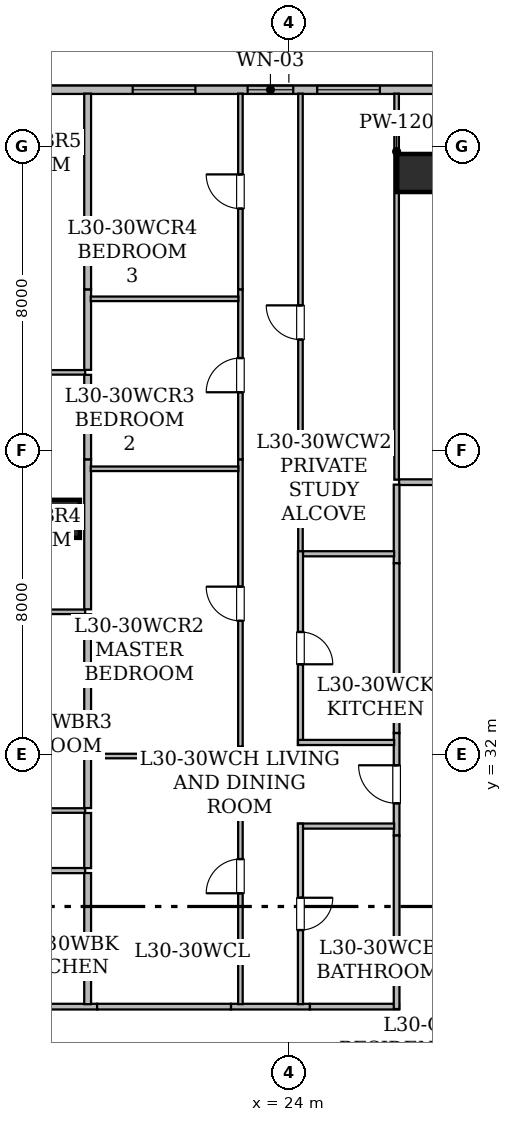
"""IFC4 building model, lengths in metres.
Left out: names, types, materials, properties, quantities, classifications, styles, units other than length and angle.
Written with IfcOpenShell. Run it as: python <this file> out.ifc"""

import sys

from ifc_helpers import new_model, si_unit, direction, frame, frame_2d, origin, origin_2d, place, context, subcontext, project, spatial, rectangle, hollow_rectangle, extrude, element, fill, save


model = new_model("IFC4")
c1 = context("Model", 3, precision=1e-05, world=origin(), true_north=direction((0.0, 1.0)))
c2 = subcontext(c1, "Body", "Model", "MODEL_VIEW")
j1 = project(units=[si_unit("LENGTHUNIT", "METRE"), si_unit("PLANEANGLEUNIT", "RADIAN")], contexts=[c1])
p1 = place(None, origin())
s1 = spatial("IfcSite", under=j1, at=p1, CompositionType="ELEMENT")
p2 = place(p1, origin())
s2 = spatial("IfcBuilding", under=s1, at=p2, CompositionType="ELEMENT")
p3 = place(p2, frame((0.0, 0.0, 120.15)))
s3 = spatial("IfcBuildingStorey", under=s2, at=p3, CompositionType="ELEMENT", Elevation=120.15)
for number, where, z_axis, x_axis in (
    (1, (27.35, 47.3, 0.0), (0.0, 0.0, 1.0), (1.0, 0.0, 0.0)),
    (2, (18.0, 38.2, 0.0), (0.0, 0.0, 1.0), (1.0, 0.0, 0.0)),
):
    element("IfcColumn", number, at=place(p3, frame(where, z_axis=z_axis, x_axis=x_axis)), inside=s3, PredefinedType="COLUMN", context=c2, shape_type="SweptSolid", body=[
        extrude(hollow_rectangle(XDim=1.0, YDim=1.0, WallThickness=0.05, at=origin_2d()), origin(), (0.0, 0.0, 1.0), 3.65),
    ])
p4 = place(p3, frame((13.715, 49.49, 0.0), z_axis=(0.0, 0.0, 1.0), x_axis=(1.0, 0.0, 0.0)))
e3 = element("IfcWall", 3, at=p4, inside=s3, PredefinedType="STANDARD", context=c2, shape_type="SweptSolid", body=[
    extrude(rectangle(XDim=38.639, YDim=0.22, at=frame_2d((19.319, 0.0))), origin(), (0.0, 0.0, 1.0), 3.43),
])
p5 = place(p4, frame((16.16, 0.0, 0.85)))
e4 = element("IfcOpeningElement", 4, at=p5, cuts=e3, PredefinedType="OPENING", context=c2, shape_type="SweptSolid", body=[
    extrude(rectangle(XDim=1.65, YDim=1.55, at=frame_2d((0.825, 0.775))), frame((0.0, 0.12, 0.0), z_axis=(0.0, -1.0, 0.0), x_axis=(1.0, 0.0, 0.0)), (0.0, 0.0, 1.0), 0.24),
])
p6 = place(p4, frame((2.243, 0.0, 0.85)))
e5 = element("IfcOpeningElement", 5, at=p6, cuts=e3, PredefinedType="OPENING", context=c2, shape_type="SweptSolid", body=[
    extrude(rectangle(XDim=1.65, YDim=1.55, at=frame_2d((0.825, 0.775))), frame((0.0, 0.12, 0.0), z_axis=(0.0, -1.0, 0.0), x_axis=(1.0, 0.0, 0.0)), (0.0, 0.0, 1.0), 0.24),
])
p7 = place(p4, frame((11.03, 0.0, 0.85)))
e6 = element("IfcOpeningElement", 6, at=p7, cuts=e3, PredefinedType="OPENING", context=c2, shape_type="SweptSolid", body=[
    extrude(rectangle(XDim=1.65, YDim=1.55, at=frame_2d((0.825, 0.775))), frame((0.0, 0.12, 0.0), z_axis=(0.0, -1.0, 0.0), x_axis=(1.0, 0.0, 0.0)), (0.0, 0.0, 1.0), 0.24),
])
p8 = place(p4, frame((9.2, 0.0, 0.8)))
e7 = element("IfcOpeningElement", 7, at=p8, cuts=e3, PredefinedType="OPENING", context=c2, shape_type="SweptSolid", body=[
    extrude(rectangle(XDim=1.2, YDim=1.5, at=frame_2d((0.6, 0.75))), frame((0.0, 0.12, 0.0), z_axis=(0.0, -1.0, 0.0), x_axis=(1.0, 0.0, 0.0)), (0.0, 0.0, 1.0), 0.24),
])
p9 = place(p4, frame((6.175, 0.0, 0.85)))
e8 = element("IfcOpeningElement", 8, at=p9, cuts=e3, PredefinedType="OPENING", context=c2, shape_type="SweptSolid", body=[
    extrude(rectangle(XDim=1.65, YDim=1.55, at=frame_2d((0.825, 0.775))), frame((0.0, 0.12, 0.0), z_axis=(0.0, -1.0, 0.0), x_axis=(1.0, 0.0, 0.0)), (0.0, 0.0, 1.0), 0.24),
])
p10 = place(p4, frame((23.425, 0.0, 0.85)))
e9 = element("IfcOpeningElement", 9, at=p10, cuts=e3, PredefinedType="OPENING", context=c2, shape_type="SweptSolid", body=[
    extrude(rectangle(XDim=1.65, YDim=1.55, at=frame_2d((0.825, 0.775))), frame((0.0, 0.12, 0.0), z_axis=(0.0, -1.0, 0.0), x_axis=(1.0, 0.0, 0.0)), (0.0, 0.0, 1.0), 0.24),
])
p11 = place(p4, frame((30.23, 0.0, 0.85)))
e10 = element("IfcOpeningElement", 10, at=p11, cuts=e3, PredefinedType="OPENING", context=c2, shape_type="SweptSolid", body=[
    extrude(rectangle(XDim=1.65, YDim=1.55, at=frame_2d((0.825, 0.775))), frame((0.0, 0.12, 0.0), z_axis=(0.0, -1.0, 0.0), x_axis=(1.0, 0.0, 0.0)), (0.0, 0.0, 1.0), 0.24),
])
p12 = place(p4, frame((36.367, 0.0, 0.85)))
e11 = element("IfcOpeningElement", 11, at=p12, cuts=e3, PredefinedType="OPENING", context=c2, shape_type="SweptSolid", body=[
    extrude(rectangle(XDim=1.65, YDim=1.55, at=frame_2d((0.825, 0.775))), frame((0.0, 0.12, 0.0), z_axis=(0.0, -1.0, 0.0), x_axis=(1.0, 0.0, 0.0)), (0.0, 0.0, 1.0), 0.24),
])
p13 = place(p3, frame((26.9, 39.165, 0.0), z_axis=(0.0, 0.0, 1.0), x_axis=(1.0, 0.0, 0.0)))
e12 = element("IfcWall", 12, at=p13, inside=s3, PredefinedType="STANDARD", context=c2, shape_type="SweptSolid", body=[
    extrude(rectangle(XDim=7.914, YDim=0.15, at=frame_2d((3.957, 0.0))), origin(), (0.0, 0.0, 1.0), 2.647),
])
p14 = place(p13, frame((3.486, 0.0, 0.0)))
e13 = element("IfcOpeningElement", 13, at=p14, cuts=e12, PredefinedType="OPENING", context=c2, shape_type="SweptSolid", body=[
    extrude(rectangle(XDim=0.9, YDim=2.1, at=frame_2d((0.45, 1.05))), frame((0.0, 0.085, 0.0), z_axis=(0.0, -1.0, 0.0), x_axis=(1.0, 0.0, 0.0)), (0.0, 0.0, 1.0), 0.17),
])
p15 = place(p3, frame((15.674, 25.365, 0.0), z_axis=(0.0, 0.0, 1.0), x_axis=(1.0, 0.0, 0.0)))
e14 = element("IfcWall", 14, at=p15, inside=s3, PredefinedType="STANDARD", context=c2, shape_type="SweptSolid", body=[
    extrude(rectangle(XDim=3.28, YDim=0.15, at=frame_2d((1.64, 0.0))), origin(), (0.0, 0.0, 1.0), 2.647),
])
p16 = place(p3, frame((26.835, 37.032, 0.0), z_axis=(0.0, 0.0, 1.0), x_axis=(0.0, 1.0, 0.0)))
e15 = element("IfcWall", 15, at=p16, inside=s3, PredefinedType="STANDARD", context=c2, shape_type="SweptSolid", body=[
    extrude(rectangle(XDim=2.068, YDim=0.15, at=frame_2d((1.034, 0.0))), origin(), (0.0, 0.0, 1.0), 2.647),
])
p17 = place(p3, frame((22.476, 25.365, 0.0), z_axis=(0.0, 0.0, 1.0), x_axis=(1.0, 0.0, 0.0)))
e16 = element("IfcWall", 16, at=p17, inside=s3, PredefinedType="STANDARD", context=c2, shape_type="SweptSolid", body=[
    extrude(rectangle(XDim=2.078, YDim=0.15, at=frame_2d((1.039, 0.0))), origin(), (0.0, 0.0, 1.0), 3.43),
])
p18 = place(p3, frame((26.835, 29.867, 0.0), z_axis=(0.0, 0.0, 1.0), x_axis=(0.0, 1.0, 0.0)))
e17 = element("IfcWall", 17, at=p18, inside=s3, PredefinedType="STANDARD", context=c2, shape_type="SweptSolid", body=[
    extrude(rectangle(XDim=2.698, YDim=0.15, at=frame_2d((1.349, 0.0))), origin(), (0.0, 0.0, 1.0), 3.43),
])
p19 = place(p18, frame((0.849, 0.0, 0.0)))
e18 = element("IfcOpeningElement", 18, at=p19, cuts=e17, PredefinedType="OPENING", context=c2, shape_type="SweptSolid", body=[
    extrude(rectangle(XDim=1.0, YDim=2.15, at=frame_2d((0.5, 1.075))), frame((0.0, 0.085, 0.0), z_axis=(0.0, -1.0, 0.0), x_axis=(1.0, 0.0, 0.0)), (0.0, 0.0, 1.0), 0.17),
])
p20 = place(p3, frame((24.554, 25.365, 0.0), z_axis=(0.0, 0.0, 1.0), x_axis=(1.0, 0.0, 0.0)))
e19 = element("IfcWall", 19, at=p20, inside=s3, PredefinedType="STANDARD", context=c2, shape_type="SweptSolid", body=[
    extrude(rectangle(XDim=2.346, YDim=0.15, at=frame_2d((1.173, 0.0))), origin(), (0.0, 0.0, 1.0), 3.43),
])
p21 = place(p3, frame((26.835, 25.302, 0.0), z_axis=(0.0, 0.0, 1.0), x_axis=(0.0, 1.0, 0.0)))
e20 = element("IfcWall", 20, at=p21, inside=s3, PredefinedType="STANDARD", context=c2, shape_type="SweptSolid", body=[
    extrude(rectangle(XDim=4.565, YDim=0.15, at=frame_2d((2.282, 0.0))), origin(), (0.0, 0.0, 1.0), 3.013),
])
p22 = place(p3, frame((26.835, 32.565, 0.0), z_axis=(0.0, 0.0, 1.0), x_axis=(0.0, 1.0, 0.0)))
e21 = element("IfcWall", 21, at=p22, inside=s3, PredefinedType="STANDARD", context=c2, shape_type="SweptSolid", body=[
    extrude(rectangle(XDim=4.467, YDim=0.15, at=frame_2d((2.233, 0.0))), origin(), (0.0, 0.0, 1.0), 2.647),
])
p23 = place(p3, frame((18.954, 25.365, 0.0), z_axis=(0.0, 0.0, 1.0), x_axis=(1.0, 0.0, 0.0)))
e22 = element("IfcWall", 22, at=p23, inside=s3, PredefinedType="STANDARD", context=c2, shape_type="SweptSolid", body=[
    extrude(rectangle(XDim=3.522, YDim=0.15, at=frame_2d((1.761, 0.0))), origin(), (0.0, 0.0, 1.0), 3.43),
])
p24 = place(p3, frame((26.835, 39.23, 0.0), z_axis=(0.0, 0.0, 1.0), x_axis=(0.0, 1.0, 0.0)))
e23 = element("IfcWall", 23, at=p24, inside=s3, PredefinedType="PARTITIONING", context=c2, shape_type="SweptSolid", body=[
    extrude(rectangle(XDim=10.158, YDim=0.12, at=frame_2d((5.079, 0.0))), origin(), (0.0, 0.0, 1.0), 2.876),
])
p25 = place(p3, frame((18.64, 28.945, 0.0), z_axis=(0.0, 0.0, 1.0), x_axis=(-1.0, 0.0, 0.0)))
e24 = element("IfcWall", 24, at=p25, inside=s3, PredefinedType="PARTITIONING", context=c2, shape_type="SweptSolid", body=[
    extrude(rectangle(XDim=2.75, YDim=0.135, at=frame_2d((1.375, 0.0))), origin(), (0.0, 0.0, 1.0), 2.647),
])
p26 = place(p3, frame((14.795, 30.525, 0.0), z_axis=(0.0, 0.0, 1.0), x_axis=(1.0, 0.0, 0.0)))
e25 = element("IfcWall", 25, at=p26, inside=s3, PredefinedType="PARTITIONING", context=c2, shape_type="SweptSolid", body=[
    extrude(rectangle(XDim=3.845, YDim=0.12, at=frame_2d((1.922, 0.0))), origin(), (0.0, 0.0, 1.0), 2.647),
])
p27 = place(p3, frame((18.705, 30.46, 0.0), z_axis=(0.0, 0.0, 1.0), x_axis=(0.0, -1.0, 0.0)))
e26 = element("IfcWall", 26, at=p27, inside=s3, PredefinedType="STANDARD", context=c2, shape_type="SweptSolid", body=[
    extrude(rectangle(XDim=1.45, YDim=0.18, at=frame_2d((0.725, 0.0))), origin(), (0.0, 0.0, 1.0), 3.43),
])
p28 = place(p3, frame((18.705, 28.88, 0.0), z_axis=(0.0, 0.0, 1.0), x_axis=(0.0, -1.0, 0.0)))
e27 = element("IfcWall", 27, at=p28, inside=s3, PredefinedType="STANDARD", context=c2, shape_type="SweptSolid", body=[
    extrude(rectangle(XDim=3.45, YDim=0.18, at=frame_2d((1.725, 0.0))), origin(), (0.0, 0.0, 1.0), 3.013),
])
p29 = place(p3, frame((14.914, 35.754, 0.0), z_axis=(0.0, 0.0, 1.0), x_axis=(1.0, 0.0, 0.0)))
e28 = element("IfcWall", 28, at=p29, inside=s3, PredefinedType="PARTITIONING", context=c2, shape_type="SweptSolid", body=[
    extrude(rectangle(XDim=3.726, YDim=0.12, at=frame_2d((1.863, 0.0))), origin(), (0.0, 0.0, 1.0), 2.647),
])
p30 = place(p3, frame((18.705, 32.208, 0.0), z_axis=(0.0, 0.0, 1.0), x_axis=(0.0, -1.0, 0.0)))
e29 = element("IfcWall", 29, at=p30, inside=s3, PredefinedType="STANDARD", context=c2, shape_type="SweptSolid", body=[
    extrude(rectangle(XDim=1.618, YDim=0.18, at=frame_2d((0.809, 0.0))), origin(), (0.0, 0.0, 1.0), 3.43),
])
p31 = place(p3, frame((18.705, 35.689, 0.0), z_axis=(0.0, 0.0, 1.0), x_axis=(0.0, -1.0, 0.0)))
e30 = element("IfcWall", 30, at=p31, inside=s3, PredefinedType="STANDARD", context=c2, shape_type="SweptSolid", body=[
    extrude(rectangle(XDim=3.481, YDim=0.18, at=frame_2d((1.74, 0.0))), origin(), (0.0, 0.0, 1.0), 3.43),
])
p32 = place(p3, frame((14.914, 42.054, 0.0), z_axis=(0.0, 0.0, 1.0), x_axis=(1.0, 0.0, 0.0)))
e31 = element("IfcWall", 31, at=p32, inside=s3, PredefinedType="PARTITIONING", context=c2, shape_type="SweptSolid", body=[
    extrude(rectangle(XDim=3.726, YDim=0.12, at=frame_2d((1.863, 0.0))), origin(), (0.0, 0.0, 1.0), 2.647),
])
p33 = place(p3, frame((18.705, 39.766, 0.0), z_axis=(0.0, 0.0, 1.0), x_axis=(0.0, -1.0, 0.0)))
e32 = element("IfcWall", 32, at=p33, inside=s3, PredefinedType="STANDARD", context=c2, shape_type="SweptSolid", body=[
    extrude(rectangle(XDim=3.947, YDim=0.18, at=frame_2d((1.974, 0.0))), origin(), (0.0, 0.0, 1.0), 2.647),
])
p34 = place(p3, frame((18.705, 41.989, 0.0), z_axis=(0.0, 0.0, 1.0), x_axis=(0.0, -1.0, 0.0)))
e33 = element("IfcWall", 33, at=p34, inside=s3, PredefinedType="STANDARD", context=c2, shape_type="SweptSolid", body=[
    extrude(rectangle(XDim=2.223, YDim=0.18, at=frame_2d((1.111, 0.0))), origin(), (0.0, 0.0, 1.0), 3.43),
])
p35 = place(p3, frame((18.705, 44.238, 0.0), z_axis=(0.0, 0.0, 1.0), x_axis=(0.0, -1.0, 0.0)))
e34 = element("IfcWall", 34, at=p35, inside=s3, PredefinedType="STANDARD", context=c2, shape_type="SweptSolid", body=[
    extrude(rectangle(XDim=2.119, YDim=0.18, at=frame_2d((1.06, 0.0))), origin(), (0.0, 0.0, 1.0), 3.43),
])
p36 = place(p3, frame((18.705, 49.388, 0.0), z_axis=(0.0, 0.0, 1.0), x_axis=(0.0, -1.0, 0.0)))
e35 = element("IfcWall", 35, at=p36, inside=s3, PredefinedType="STANDARD", context=c2, shape_type="SweptSolid", body=[
    extrude(rectangle(XDim=5.15, YDim=0.18, at=frame_2d((2.575, 0.0))), origin(), (0.0, 0.0, 1.0), 2.876),
])
p37 = place(p3, frame((24.305, 37.346, 0.0), z_axis=(0.0, 0.0, 1.0), x_axis=(0.0, 1.0, 0.0)))
e36 = element("IfcWall", 36, at=p37, inside=s3, PredefinedType="PARTITIONING", context=c2, shape_type="SweptSolid", body=[
    extrude(rectangle(XDim=12.042, YDim=0.12, at=frame_2d((6.021, 0.0))), origin(), (0.0, 0.0, 1.0), 2.647),
])
p38 = place(p37, frame((5.571, 0.0, 0.0)))
e37 = element("IfcOpeningElement", 37, at=p38, cuts=e36, PredefinedType="OPENING", context=c2, shape_type="SweptSolid", body=[
    extrude(rectangle(XDim=0.9, YDim=2.1, at=frame_2d((0.45, 1.05))), frame((0.0, 0.07, 0.0), z_axis=(0.0, -1.0, 0.0), x_axis=(1.0, 0.0, 0.0)), (0.0, 0.0, 1.0), 0.14),
])
p39 = place(p3, frame((26.77, 37.281, 0.0), z_axis=(0.0, 0.0, 1.0), x_axis=(-1.0, 0.0, 0.0)))
e38 = element("IfcWall", 38, at=p39, inside=s3, PredefinedType="PARTITIONING", context=c2, shape_type="SweptSolid", body=[
    extrude(rectangle(XDim=2.4, YDim=0.135, at=frame_2d((1.2, 0.0))), origin(), (0.0, 0.0, 1.0), 2.647),
])
p40 = place(p3, frame((26.77, 30.116, 0.0), z_axis=(0.0, 0.0, 1.0), x_axis=(-1.0, 0.0, 0.0)))
e39 = element("IfcWall", 39, at=p40, inside=s3, PredefinedType="PARTITIONING", context=c2, shape_type="SweptSolid", body=[
    extrude(rectangle(XDim=2.53, YDim=0.135, at=frame_2d((1.265, 0.0))), origin(), (0.0, 0.0, 1.0), 3.43),
])
p41 = place(p3, frame((24.305, 30.181, 0.0), z_axis=(0.0, 0.0, 1.0), x_axis=(0.0, -1.0, 0.0)))
e40 = element("IfcWall", 40, at=p41, inside=s3, PredefinedType="PARTITIONING", context=c2, shape_type="SweptSolid", body=[
    extrude(rectangle(XDim=4.751, YDim=0.135, at=frame_2d((2.375, 0.0))), origin(), (0.0, 0.0, 1.0), 3.013),
])
p42 = place(p41, frame((1.951, 0.0, 0.0)))
e41 = element("IfcOpeningElement", 41, at=p42, cuts=e40, PredefinedType="OPENING", context=c2, shape_type="SweptSolid", body=[
    extrude(rectangle(XDim=0.85, YDim=2.1, at=frame_2d((0.425, 1.05))), frame((0.0, 0.077, 0.0), z_axis=(0.0, -1.0, 0.0), x_axis=(1.0, 0.0, 0.0)), (0.0, 0.0, 1.0), 0.155),
])
p43 = place(p3, frame((24.305, 37.346, 0.0), z_axis=(0.0, 0.0, 1.0), x_axis=(0.0, -1.0, 0.0)))
e42 = element("IfcWall", 42, at=p43, inside=s3, PredefinedType="PARTITIONING", context=c2, shape_type="SweptSolid", body=[
    extrude(rectangle(XDim=5.095, YDim=0.135, at=frame_2d((2.547, 0.0))), origin(), (0.0, 0.0, 1.0), 2.647),
])
p44 = place(p43, frame((2.123, 0.0, 0.0)))
e43 = element("IfcOpeningElement", 43, at=p44, cuts=e42, PredefinedType="OPENING", context=c2, shape_type="SweptSolid", body=[
    extrude(rectangle(XDim=0.85, YDim=2.1, at=frame_2d((0.425, 1.05))), frame((0.0, 0.077, 0.0), z_axis=(0.0, -1.0, 0.0), x_axis=(1.0, 0.0, 0.0)), (0.0, 0.0, 1.0), 0.155),
])
p45 = place(p3, frame((24.24, 32.316, 0.0), z_axis=(0.0, 0.0, 1.0), x_axis=(1.0, 0.0, 0.0)))
e44 = element("IfcWall", 44, at=p45, inside=s3, PredefinedType="PARTITIONING", context=c2, shape_type="SweptSolid", body=[
    extrude(rectangle(XDim=2.53, YDim=0.135, at=frame_2d((1.265, 0.0))), origin(), (0.0, 0.0, 1.0), 3.43),
])
p46 = place(p3, frame((22.725, 25.43, 0.0), z_axis=(0.0, 0.0, 1.0), x_axis=(0.0, 1.0, 0.0)))
e45 = element("IfcWall", 45, at=p46, inside=s3, PredefinedType="PARTITIONING", context=c2, shape_type="SweptSolid", body=[
    extrude(rectangle(XDim=6.778, YDim=0.12, at=frame_2d((3.389, 0.0))), origin(), (0.0, 0.0, 1.0), 3.013),
])
p47 = place(p46, frame((2.918, 0.0, 0.0)))
e46 = element("IfcOpeningElement", 46, at=p47, cuts=e45, PredefinedType="OPENING", context=c2, shape_type="SweptSolid", body=[
    extrude(rectangle(XDim=0.9, YDim=2.1, at=frame_2d((0.45, 1.05))), frame((0.0, 0.07, 0.0), z_axis=(0.0, -1.0, 0.0), x_axis=(1.0, 0.0, 0.0)), (0.0, 0.0, 1.0), 0.14),
])
p48 = place(p3, frame((22.725, 32.208, 0.0), z_axis=(0.0, 0.0, 1.0), x_axis=(0.0, 1.0, 0.0)))
e47 = element("IfcWall", 47, at=p48, inside=s3, PredefinedType="PARTITIONING", context=c2, shape_type="SweptSolid", body=[
    extrude(rectangle(XDim=7.558, YDim=0.12, at=frame_2d((3.779, 0.0))), origin(), (0.0, 0.0, 1.0), 2.647),
])
p49 = place(p48, frame((3.308, 0.0, 0.0)))
e48 = element("IfcOpeningElement", 48, at=p49, cuts=e47, PredefinedType="OPENING", context=c2, shape_type="SweptSolid", body=[
    extrude(rectangle(XDim=0.9, YDim=2.1, at=frame_2d((0.45, 1.05))), frame((0.0, 0.07, 0.0), z_axis=(0.0, -1.0, 0.0), x_axis=(1.0, 0.0, 0.0)), (0.0, 0.0, 1.0), 0.14),
])
p50 = place(p3, frame((22.725, 39.766, 0.0), z_axis=(0.0, 0.0, 1.0), x_axis=(0.0, 1.0, 0.0)))
e49 = element("IfcWall", 49, at=p50, inside=s3, PredefinedType="PARTITIONING", context=c2, shape_type="SweptSolid", body=[
    extrude(rectangle(XDim=4.472, YDim=0.12, at=frame_2d((2.236, 0.0))), origin(), (0.0, 0.0, 1.0), 3.43),
])
p51 = place(p50, frame((1.765, 0.0, 0.0)))
e50 = element("IfcOpeningElement", 50, at=p51, cuts=e49, PredefinedType="OPENING", context=c2, shape_type="SweptSolid", body=[
    extrude(rectangle(XDim=0.9, YDim=2.1, at=frame_2d((0.45, 1.05))), frame((0.0, 0.07, 0.0), z_axis=(0.0, -1.0, 0.0), x_axis=(1.0, 0.0, 0.0)), (0.0, 0.0, 1.0), 0.14),
])
p52 = place(p3, frame((22.725, 44.238, 0.0), z_axis=(0.0, 0.0, 1.0), x_axis=(0.0, 1.0, 0.0)))
e51 = element("IfcWall", 51, at=p52, inside=s3, PredefinedType="PARTITIONING", context=c2, shape_type="SweptSolid", body=[
    extrude(rectangle(XDim=5.15, YDim=0.12, at=frame_2d((2.575, 0.0))), origin(), (0.0, 0.0, 1.0), 2.876),
])
p53 = place(p52, frame((2.125, 0.0, 0.0)))
e52 = element("IfcOpeningElement", 52, at=p53, cuts=e51, PredefinedType="OPENING", context=c2, shape_type="SweptSolid", body=[
    extrude(rectangle(XDim=0.9, YDim=2.1, at=frame_2d((0.45, 1.05))), frame((0.0, 0.07, 0.0), z_axis=(0.0, -1.0, 0.0), x_axis=(1.0, 0.0, 0.0)), (0.0, 0.0, 1.0), 0.14),
])
for number, where, z_axis, x_axis in (
    (53, (18.787, 31.959, 0.0), (0.0, 0.0, 1.0), (1.0, 0.0, 0.0)),
    (54, (18.787, 39.517, 0.0), (0.0, 0.0, 1.0), (1.0, 0.0, 0.0)),
    (55, (18.787, 43.989, 0.0), (0.0, 0.0, 1.0), (1.0, 0.0, 0.0)),
):
    element("IfcWall", number, at=place(p3, frame(where, z_axis=z_axis, x_axis=x_axis)), inside=s3, PredefinedType="PARTITIONING", context=c2, shape_type="SweptSolid", body=[
        extrude(rectangle(XDim=3.884, YDim=0.12, at=frame_2d((1.942, 0.0))), origin(), (0.0, 0.0, 1.0), 3.43),
    ])
p54 = place(p7, origin())
e56 = element("IfcWindow", 56, at=p54, inside=s3, PartitioningType="SINGLE_PANEL", PredefinedType="WINDOW", context=c2, shape_type="SweptSolid", body=[
    extrude(rectangle(XDim=1.65, YDim=1.55, at=frame_2d((0.825, 0.775))), frame((0.0, 0.03, 0.0), z_axis=(0.0, -1.0, 0.0), x_axis=(1.0, 0.0, 0.0)), (0.0, 0.0, 1.0), 0.06),
])
fill(e6, e56)
p55 = place(p8, origin())
e57 = element("IfcWindow", 57, at=p55, inside=s3, PartitioningType="SINGLE_PANEL", PredefinedType="WINDOW", context=c2, shape_type="SweptSolid", body=[
    extrude(rectangle(XDim=1.2, YDim=1.5, at=frame_2d((0.6, 0.75))), frame((0.0, 0.03, 0.0), z_axis=(0.0, -1.0, 0.0), x_axis=(1.0, 0.0, 0.0)), (0.0, 0.0, 1.0), 0.06),
])
fill(e7, e57)
p56 = place(p9, origin())
e58 = element("IfcWindow", 58, at=p56, inside=s3, PartitioningType="SINGLE_PANEL", PredefinedType="WINDOW", context=c2, shape_type="SweptSolid", body=[
    extrude(rectangle(XDim=1.65, YDim=1.55, at=frame_2d((0.825, 0.775))), frame((0.0, 0.03, 0.0), z_axis=(0.0, -1.0, 0.0), x_axis=(1.0, 0.0, 0.0)), (0.0, 0.0, 1.0), 0.06),
])
fill(e8, e58)
p57 = place(p19, origin())
e59 = element("IfcDoor", 59, at=p57, inside=s3, OperationType="SINGLE_SWING_RIGHT", PredefinedType="DOOR", context=c2, shape_type="SweptSolid", body=[
    extrude(rectangle(XDim=1.0, YDim=2.15, at=frame_2d((0.5, 1.075))), frame((0.0, 0.025, 0.0), z_axis=(0.0, -1.0, 0.0), x_axis=(1.0, 0.0, 0.0)), (0.0, 0.0, 1.0), 0.05),
])
fill(e18, e59)
p58 = place(p38, origin())
e60 = element("IfcDoor", 60, at=p58, inside=s3, OperationType="SINGLE_SWING_RIGHT", PredefinedType="DOOR", context=c2, shape_type="SweptSolid", body=[
    extrude(rectangle(XDim=0.9, YDim=2.1, at=frame_2d((0.45, 1.05))), frame((0.0, 0.025, 0.0), z_axis=(0.0, -1.0, 0.0), x_axis=(1.0, 0.0, 0.0)), (0.0, 0.0, 1.0), 0.05),
])
fill(e37, e60)
p59 = place(p42, origin())
e61 = element("IfcDoor", 61, at=p59, inside=s3, OperationType="SINGLE_SWING_LEFT", PredefinedType="DOOR", context=c2, shape_type="SweptSolid", body=[
    extrude(rectangle(XDim=0.85, YDim=2.1, at=frame_2d((0.425, 1.05))), frame((0.0, 0.025, 0.0), z_axis=(0.0, -1.0, 0.0), x_axis=(1.0, 0.0, 0.0)), (0.0, 0.0, 1.0), 0.05),
])
fill(e41, e61)
p60 = place(p44, origin())
e62 = element("IfcDoor", 62, at=p60, inside=s3, OperationType="SINGLE_SWING_RIGHT", PredefinedType="DOOR", context=c2, shape_type="SweptSolid", body=[
    extrude(rectangle(XDim=0.85, YDim=2.1, at=frame_2d((0.425, 1.05))), frame((0.0, 0.025, 0.0), z_axis=(0.0, -1.0, 0.0), x_axis=(1.0, 0.0, 0.0)), (0.0, 0.0, 1.0), 0.05),
])
fill(e43, e62)
p61 = place(p47, origin())
e63 = element("IfcDoor", 63, at=p61, inside=s3, OperationType="SINGLE_SWING_LEFT", PredefinedType="DOOR", context=c2, shape_type="SweptSolid", body=[
    extrude(rectangle(XDim=0.9, YDim=2.1, at=frame_2d((0.45, 1.05))), frame((0.0, 0.025, 0.0), z_axis=(0.0, -1.0, 0.0), x_axis=(1.0, 0.0, 0.0)), (0.0, 0.0, 1.0), 0.05),
])
fill(e46, e63)
p62 = place(p49, origin())
e64 = element("IfcDoor", 64, at=p62, inside=s3, OperationType="SINGLE_SWING_RIGHT", PredefinedType="DOOR", context=c2, shape_type="SweptSolid", body=[
    extrude(rectangle(XDim=0.9, YDim=2.1, at=frame_2d((0.45, 1.05))), frame((0.0, 0.025, 0.0), z_axis=(0.0, -1.0, 0.0), x_axis=(1.0, 0.0, 0.0)), (0.0, 0.0, 1.0), 0.05),
])
fill(e48, e64)
p63 = place(p51, origin())
e65 = element("IfcDoor", 65, at=p63, inside=s3, OperationType="SINGLE_SWING_LEFT", PredefinedType="DOOR", context=c2, shape_type="SweptSolid", body=[
    extrude(rectangle(XDim=0.9, YDim=2.1, at=frame_2d((0.45, 1.05))), frame((0.0, 0.025, 0.0), z_axis=(0.0, -1.0, 0.0), x_axis=(1.0, 0.0, 0.0)), (0.0, 0.0, 1.0), 0.05),
])
fill(e50, e65)
p64 = place(p53, origin())
e66 = element("IfcDoor", 66, at=p64, inside=s3, OperationType="SINGLE_SWING_RIGHT", PredefinedType="DOOR", context=c2, shape_type="SweptSolid", body=[
    extrude(rectangle(XDim=0.9, YDim=2.1, at=frame_2d((0.45, 1.05))), frame((0.0, 0.025, 0.0), z_axis=(0.0, -1.0, 0.0), x_axis=(1.0, 0.0, 0.0)), (0.0, 0.0, 1.0), 0.05),
])
fill(e52, e66)
save(model, sys.argv[1])
